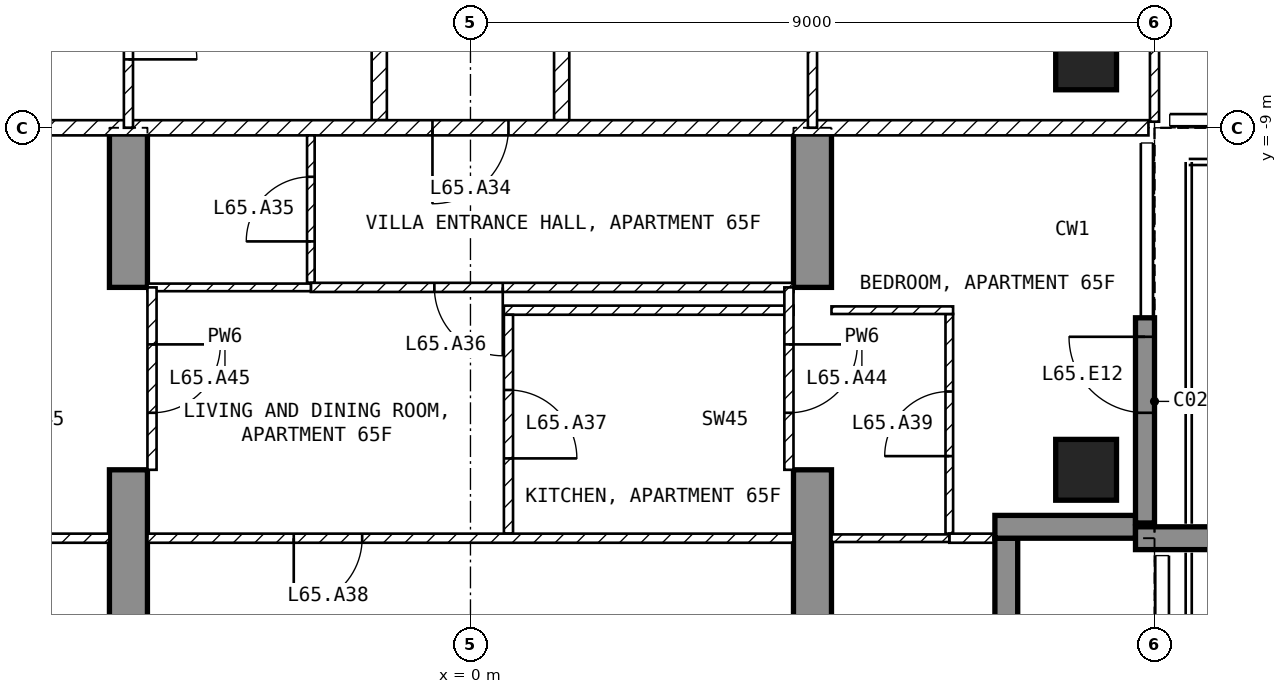
"""IFC4 building model, lengths in metres.
Left out: names, types, materials, properties, quantities, classifications, styles, units other than length and angle.
Written with IfcOpenShell. Run it as: python <this file> out.ifc"""

import sys

from ifc_helpers import new_model, si_unit, direction, frame, frame_2d, origin, origin_2d, place, context, subcontext, project, spatial, polyline, rectangle, outline, extrude, element, fill, save


model = new_model("IFC4")
c1 = context("Model", 3, precision=1e-05, world=origin(), true_north=direction((0.0, 1.0)))
c2 = subcontext(c1, "Body", "Model", "MODEL_VIEW")
j1 = project(units=[si_unit("LENGTHUNIT", "METRE"), si_unit("PLANEANGLEUNIT", "RADIAN")], contexts=[c1])
p1 = place(None, origin())
s1 = spatial("IfcSite", under=j1, at=p1, CompositionType="ELEMENT")
p2 = place(p1, origin())
s2 = spatial("IfcBuilding", under=s1, at=p2, CompositionType="ELEMENT")
p3 = place(p2, frame((0.0, 0.0, 257.0)))
s3 = spatial("IfcBuildingStorey", under=s2, at=p3, CompositionType="ELEMENT", Elevation=257.0)
for number, where, z_axis, x_axis in (
    (1, (8.1, -13.5, -0.25), (0.0, 0.0, 1.0), (1.0, 0.0, 0.0)),
    (2, (8.1, -8.1, -0.25), (0.0, 0.0, 1.0), (1.0, 0.0, 0.0)),
):
    element("IfcColumn", number, at=place(p3, frame(where, z_axis=z_axis, x_axis=x_axis)), inside=s3, PredefinedType="COLUMN", context=c2, shape_type="SweptSolid", body=[
        extrude(rectangle(XDim=0.8, YDim=0.8, at=origin_2d()), origin(), (0.0, 0.0, 1.0), 3.5),
    ])
for number, where, z_axis, x_axis in (
    (3, (-4.75, -16.7, -0.25), (1.0, 0.0, 0.0), (0.0, 1.0, 0.0)),
    (4, (4.25, -16.7, -0.25), (1.0, 0.0, 0.0), (0.0, 1.0, 0.0)),
):
    element("IfcWall", number, at=place(p3, frame(where, z_axis=z_axis, x_axis=x_axis)), inside=s3, PredefinedType="SHEAR", context=c2, shape_type="SweptSolid", body=[
        extrude(outline(polyline([(0.0, 0.0), (3.2, 0.0), (3.2, 2.65), (5.6, 2.65), (5.6, 0.0), (7.7, 0.0), (7.7, 3.5), (0.0, 3.5), (0.0, 0.0)])), origin(), (0.0, 0.0, 1.0), 0.5),
    ])
p4 = place(p3, frame((8.875, -14.2, 0.0), z_axis=(0.0, 0.0, 1.0), x_axis=(0.0, 1.0, 0.0)))
e5 = element("IfcWall", 5, at=p4, inside=s3, PredefinedType="SOLIDWALL", context=c2, shape_type="SweptSolid", body=[
    extrude(rectangle(XDim=2.7, YDim=0.25, at=frame_2d((1.35, 0.0))), origin(), (0.0, 0.0, 1.0), 3.25),
])
p5 = place(p4, frame((1.45, 0.0, 0.0)))
e6 = element("IfcOpeningElement", 6, at=p5, cuts=e5, PredefinedType="OPENING", context=c2, shape_type="SweptSolid", body=[
    extrude(rectangle(XDim=1.0, YDim=2.4, at=frame_2d((0.5, 1.2))), frame((0.0, 0.135, 0.0), z_axis=(0.0, -1.0, 0.0), x_axis=(1.0, 0.0, 0.0)), (0.0, 0.0, 1.0), 0.27),
])
p6 = place(p3, frame((7.05, -16.2, 0.0), z_axis=(0.0, 0.0, 1.0), x_axis=(0.0, 1.0, 0.0)))
e7 = element("IfcWall", 7, at=p6, inside=s3, PredefinedType="SOLIDWALL", context=c2, shape_type="SweptSolid", body=[
    extrude(rectangle(XDim=1.8, YDim=0.3, at=frame_2d((0.9, 0.0))), origin(), (0.0, 0.0, 1.0), 3.25),
])
p7 = place(p3, frame((6.9, -14.25, 0.0), z_axis=(0.0, 0.0, 1.0), x_axis=(1.0, 0.0, 0.0)))
e8 = element("IfcWall", 8, at=p7, inside=s3, PredefinedType="SOLIDWALL", context=c2, shape_type="SweptSolid", body=[
    extrude(rectangle(XDim=1.85, YDim=0.3, at=frame_2d((0.925, 0.0))), origin(), (0.0, 0.0, 1.0), 3.25),
])
p8 = place(p3, frame((8.75, -14.4, 0.0), z_axis=(0.0, 0.0, 1.0), x_axis=(1.0, 0.0, 0.0)))
e9 = element("IfcWall", 9, at=p8, inside=s3, PredefinedType="SOLIDWALL", context=c2, shape_type="SweptSolid", body=[
    extrude(rectangle(XDim=2.95, YDim=0.3, at=frame_2d((1.475, 0.0))), origin(), (0.0, 0.0, 1.0), 3.25),
])
for number, where, z_axis, x_axis in (
    (10, (1.2, -4.6, 0.0), (0.0, 0.0, 1.0), (0.0, -1.0, 0.0)),
    (11, (-1.2, -8.9, 0.0), (0.0, 0.0, 1.0), (0.0, 1.0, 0.0)),
):
    element("IfcWall", number, at=place(p3, frame(where, z_axis=z_axis, x_axis=x_axis)), inside=s3, PredefinedType="PARTITIONING", context=c2, shape_type="SweptSolid", body=[
        extrude(rectangle(XDim=4.3, YDim=0.2, at=frame_2d((2.15, 0.0))), origin(), (0.0, 0.0, 1.0), 3.25),
    ])
p9 = place(p3, frame((8.92, -9.0, 0.0), z_axis=(0.0, 0.0, 1.0), x_axis=(-1.0, 0.0, 0.0)))
e12 = element("IfcWall", 12, at=p9, inside=s3, PredefinedType="PARTITIONING", context=c2, shape_type="SweptSolid", body=[
    extrude(rectangle(XDim=17.84, YDim=0.2, at=frame_2d((8.92, 0.0))), origin(), (0.0, 0.0, 1.0), 3.25),
])
p10 = place(p9, frame((8.42, 0.0, 0.0)))
e13 = element("IfcOpeningElement", 13, at=p10, cuts=e12, PredefinedType="OPENING", context=c2, shape_type="SweptSolid", body=[
    extrude(rectangle(XDim=1.0, YDim=2.1, at=frame_2d((0.5, 1.05))), frame((0.0, 0.11, 0.0), z_axis=(0.0, -1.0, 0.0), x_axis=(1.0, 0.0, 0.0)), (0.0, 0.0, 1.0), 0.22),
])
p11 = place(p3, frame((9.0, -8.92, 0.0), z_axis=(0.0, 0.0, 1.0), x_axis=(0.0, 1.0, 0.0)))
e14 = element("IfcWall", 14, at=p11, inside=s3, PredefinedType="PARTITIONING", context=c2, shape_type="SweptSolid", body=[
    extrude(rectangle(XDim=5.32, YDim=0.12, at=frame_2d((2.66, 0.0))), origin(), (0.0, 0.0, 1.0), 3.25),
])
p12 = place(p11, frame((2.32, 0.0, 0.0)))
e15 = element("IfcOpeningElement", 15, at=p12, cuts=e14, PredefinedType="OPENING", context=c2, shape_type="SweptSolid", body=[
    extrude(rectangle(XDim=0.9, YDim=2.1, at=frame_2d((0.45, 1.05))), frame((0.0, 0.07, 0.0), z_axis=(0.0, -1.0, 0.0), x_axis=(1.0, 0.0, 0.0)), (0.0, 0.0, 1.0), 0.14),
])
p13 = place(p3, frame((4.5, -9.0, 0.0), z_axis=(0.0, 0.0, 1.0), x_axis=(0.0, 1.0, 0.0)))
e16 = element("IfcWall", 16, at=p13, inside=s3, PredefinedType="PARTITIONING", context=c2, shape_type="SweptSolid", body=[
    extrude(rectangle(XDim=4.5, YDim=0.12, at=frame_2d((2.25, 0.0))), origin(), (0.0, 0.0, 1.0), 3.25),
])
p14 = place(p13, frame((1.8, 0.0, 0.0)))
e17 = element("IfcOpeningElement", 17, at=p14, cuts=e16, PredefinedType="OPENING", context=c2, shape_type="SweptSolid", body=[
    extrude(rectangle(XDim=0.9, YDim=2.1, at=frame_2d((0.45, 1.05))), frame((0.0, 0.07, 0.0), z_axis=(0.0, -1.0, 0.0), x_axis=(1.0, 0.0, 0.0)), (0.0, 0.0, 1.0), 0.14),
])
p15 = place(p3, frame((-4.5, -6.3, 0.0), z_axis=(0.0, 0.0, 1.0), x_axis=(0.0, -1.0, 0.0)))
e18 = element("IfcWall", 18, at=p15, inside=s3, PredefinedType="PARTITIONING", context=c2, shape_type="SweptSolid", body=[
    extrude(rectangle(XDim=2.7, YDim=0.12, at=frame_2d((1.35, 0.0))), origin(), (0.0, 0.0, 1.0), 3.25),
])
p16 = place(p15, frame((0.9, 0.0, 0.0)))
e19 = element("IfcOpeningElement", 19, at=p16, cuts=e18, PredefinedType="OPENING", context=c2, shape_type="SweptSolid", body=[
    extrude(rectangle(XDim=0.9, YDim=2.1, at=frame_2d((0.45, 1.05))), frame((0.0, 0.07, 0.0), z_axis=(0.0, -1.0, 0.0), x_axis=(1.0, 0.0, 0.0)), (0.0, 0.0, 1.0), 0.14),
])
p17 = place(p3, frame((-2.1, -11.04, 0.0), z_axis=(0.0, 0.0, 1.0), x_axis=(0.0, 1.0, 0.0)))
e20 = element("IfcWall", 20, at=p17, inside=s3, PredefinedType="PARTITIONING", context=c2, shape_type="SweptSolid", body=[
    extrude(rectangle(XDim=1.94, YDim=0.1, at=frame_2d((0.97, 0.0))), origin(), (0.0, 0.0, 1.0), 3.25),
])
p18 = place(p17, frame((0.545, 0.0, 0.0)))
e21 = element("IfcOpeningElement", 21, at=p18, cuts=e20, PredefinedType="OPENING", context=c2, shape_type="SweptSolid", body=[
    extrude(rectangle(XDim=0.85, YDim=2.1, at=frame_2d((0.425, 1.05))), frame((0.0, 0.06, 0.0), z_axis=(0.0, -1.0, 0.0), x_axis=(1.0, 0.0, 0.0)), (0.0, 0.0, 1.0), 0.12),
])
p19 = place(p3, frame((4.25, -11.1, 0.0), z_axis=(0.0, 0.0, 1.0), x_axis=(-1.0, 0.0, 0.0)))
e22 = element("IfcWall", 22, at=p19, inside=s3, PredefinedType="PARTITIONING", context=c2, shape_type="SweptSolid", body=[
    extrude(rectangle(XDim=6.35, YDim=0.12, at=frame_2d((3.175, 0.0))), origin(), (0.0, 0.0, 1.0), 3.25),
])
p20 = place(p19, frame((3.825, 0.0, 0.0)))
e23 = element("IfcOpeningElement", 23, at=p20, cuts=e22, PredefinedType="OPENING", context=c2, shape_type="SweptSolid", body=[
    extrude(rectangle(XDim=0.9, YDim=2.1, at=frame_2d((0.45, 1.05))), frame((0.0, 0.07, 0.0), z_axis=(0.0, -1.0, 0.0), x_axis=(1.0, 0.0, 0.0)), (0.0, 0.0, 1.0), 0.14),
])
p21 = place(p3, frame((-2.1, -11.1, 0.0), z_axis=(0.0, 0.0, 1.0), x_axis=(-1.0, 0.0, 0.0)))
e24 = element("IfcWall", 24, at=p21, inside=s3, PredefinedType="PARTITIONING", context=c2, shape_type="SweptSolid", body=[
    extrude(rectangle(XDim=2.15, YDim=0.1, at=frame_2d((1.075, 0.0))), origin(), (0.0, 0.0, 1.0), 3.25),
])
p22 = place(p3, frame((4.25, -11.4, 0.0), z_axis=(0.0, 0.0, 1.0), x_axis=(-1.0, 0.0, 0.0)))
e25 = element("IfcWall", 25, at=p22, inside=s3, PredefinedType="PARTITIONING", context=c2, shape_type="SweptSolid", body=[
    extrude(rectangle(XDim=3.81, YDim=0.12, at=frame_2d((1.905, 0.0))), origin(), (0.0, 0.0, 1.0), 3.25),
])
p23 = place(p3, frame((0.5, -11.46, 0.0), z_axis=(0.0, 0.0, 1.0), x_axis=(0.0, -1.0, 0.0)))
e26 = element("IfcWall", 26, at=p23, inside=s3, PredefinedType="PARTITIONING", context=c2, shape_type="SweptSolid", body=[
    extrude(rectangle(XDim=2.88, YDim=0.12, at=frame_2d((1.44, 0.0))), origin(), (0.0, 0.0, 1.0), 3.25),
])
p24 = place(p23, frame((0.99, 0.0, 0.0)))
e27 = element("IfcOpeningElement", 27, at=p24, cuts=e26, PredefinedType="OPENING", context=c2, shape_type="SweptSolid", body=[
    extrude(rectangle(XDim=0.9, YDim=2.1, at=frame_2d((0.45, 1.05))), frame((0.0, 0.07, 0.0), z_axis=(0.0, -1.0, 0.0), x_axis=(1.0, 0.0, 0.0)), (0.0, 0.0, 1.0), 0.14),
])
p25 = place(p3, frame((4.25, -14.4, 0.0), z_axis=(0.0, 0.0, 1.0), x_axis=(-1.0, 0.0, 0.0)))
e28 = element("IfcWall", 28, at=p25, inside=s3, PredefinedType="PARTITIONING", context=c2, shape_type="SweptSolid", body=[
    extrude(rectangle(XDim=8.5, YDim=0.12, at=frame_2d((4.25, 0.0))), origin(), (0.0, 0.0, 1.0), 3.25),
])
p26 = place(p25, frame((5.675, 0.0, 0.0)))
e29 = element("IfcOpeningElement", 29, at=p26, cuts=e28, PredefinedType="OPENING", context=c2, shape_type="SweptSolid", body=[
    extrude(rectangle(XDim=0.9, YDim=2.1, at=frame_2d((0.45, 1.05))), frame((0.0, 0.07, 0.0), z_axis=(0.0, -1.0, 0.0), x_axis=(1.0, 0.0, 0.0)), (0.0, 0.0, 1.0), 0.14),
])
p27 = place(p3, frame((6.3, -14.34, 0.0), z_axis=(0.0, 0.0, 1.0), x_axis=(0.0, 1.0, 0.0)))
e30 = element("IfcWall", 30, at=p27, inside=s3, PredefinedType="PARTITIONING", context=c2, shape_type="SweptSolid", body=[
    extrude(rectangle(XDim=2.89, YDim=0.1, at=frame_2d((1.445, 0.0))), origin(), (0.0, 0.0, 1.0), 3.25),
])
p28 = place(p27, frame((1.02, 0.0, 0.0)))
e31 = element("IfcOpeningElement", 31, at=p28, cuts=e30, PredefinedType="OPENING", context=c2, shape_type="SweptSolid", body=[
    extrude(rectangle(XDim=0.85, YDim=2.1, at=frame_2d((0.425, 1.05))), frame((0.0, 0.06, 0.0), z_axis=(0.0, -1.0, 0.0), x_axis=(1.0, 0.0, 0.0)), (0.0, 0.0, 1.0), 0.12),
])
p29 = place(p3, frame((6.35, -11.4, 0.0), z_axis=(0.0, 0.0, 1.0), x_axis=(-1.0, 0.0, 0.0)))
e32 = element("IfcWall", 32, at=p29, inside=s3, PredefinedType="PARTITIONING", context=c2, shape_type="SweptSolid", body=[
    extrude(rectangle(XDim=1.6, YDim=0.1, at=frame_2d((0.8, 0.0))), origin(), (0.0, 0.0, 1.0), 3.25),
])
p30 = place(p3, frame((7.12, -14.4, 0.0), z_axis=(0.0, 0.0, 1.0), x_axis=(-1.0, 0.0, 0.0)))
e33 = element("IfcWall", 33, at=p30, inside=s3, PredefinedType="PARTITIONING", context=c2, shape_type="SweptSolid", body=[
    extrude(rectangle(XDim=0.82, YDim=0.12, at=frame_2d((0.41, 0.0))), origin(), (0.0, 0.0, 1.0), 3.25),
])
p31 = place(p3, frame((6.3, -14.4, 0.0), z_axis=(0.0, 0.0, 1.0), x_axis=(-1.0, 0.0, 0.0)))
e34 = element("IfcWall", 34, at=p31, inside=s3, PredefinedType="PARTITIONING", context=c2, shape_type="SweptSolid", body=[
    extrude(rectangle(XDim=1.55, YDim=0.1, at=frame_2d((0.775, 0.0))), origin(), (0.0, 0.0, 1.0), 3.25),
])
p32 = place(p3, frame((-4.75, -14.4, 0.0), z_axis=(0.0, 0.0, 1.0), x_axis=(-1.0, 0.0, 0.0)))
e35 = element("IfcWall", 35, at=p32, inside=s3, PredefinedType="PARTITIONING", context=c2, shape_type="SweptSolid", body=[
    extrude(rectangle(XDim=2.37, YDim=0.12, at=frame_2d((1.185, 0.0))), origin(), (0.0, 0.0, 1.0), 3.25),
])
p33 = place(p3, frame((4.19, -11.1, 0.0), z_axis=(0.0, 0.0, 1.0), x_axis=(0.0, -1.0, 0.0)))
e36 = element("IfcWall", 36, at=p33, inside=s3, PredefinedType="PARTITIONING", context=c2, shape_type="SweptSolid", body=[
    extrude(rectangle(XDim=2.4, YDim=0.12, at=frame_2d((1.2, 0.0))), origin(), (0.0, 0.0, 1.0), 2.4),
])
p34 = place(p33, frame((0.75, 0.0, 0.0)))
e37 = element("IfcOpeningElement", 37, at=p34, cuts=e36, PredefinedType="OPENING", context=c2, shape_type="SweptSolid", body=[
    extrude(rectangle(XDim=0.9, YDim=2.1, at=frame_2d((0.45, 1.05))), frame((0.0, 0.07, 0.0), z_axis=(0.0, -1.0, 0.0), x_axis=(1.0, 0.0, 0.0)), (0.0, 0.0, 1.0), 0.14),
])
p35 = place(p3, frame((-4.19, -11.1, 0.0), z_axis=(0.0, 0.0, 1.0), x_axis=(0.0, -1.0, 0.0)))
e38 = element("IfcWall", 38, at=p35, inside=s3, PredefinedType="PARTITIONING", context=c2, shape_type="SweptSolid", body=[
    extrude(rectangle(XDim=2.4, YDim=0.12, at=frame_2d((1.2, 0.0))), origin(), (0.0, 0.0, 1.0), 2.4),
])
p36 = place(p35, frame((0.75, 0.0, 0.0)))
e39 = element("IfcOpeningElement", 39, at=p36, cuts=e38, PredefinedType="OPENING", context=c2, shape_type="SweptSolid", body=[
    extrude(rectangle(XDim=0.9, YDim=2.1, at=frame_2d((0.45, 1.05))), frame((0.0, 0.07, 0.0), z_axis=(0.0, -1.0, 0.0), x_axis=(1.0, 0.0, 0.0)), (0.0, 0.0, 1.0), 0.14),
])
p37 = place(p5, origin())
e40 = element("IfcDoor", 40, at=p37, inside=s3, OperationType="SINGLE_SWING_RIGHT", PredefinedType="DOOR", context=c2, shape_type="SweptSolid", body=[
    extrude(rectangle(XDim=1.0, YDim=2.4, at=frame_2d((0.5, 1.2))), frame((0.0, 0.025, 0.0), z_axis=(0.0, -1.0, 0.0), x_axis=(1.0, 0.0, 0.0)), (0.0, 0.0, 1.0), 0.05),
])
fill(e6, e40)
p38 = place(p16, origin())
e41 = element("IfcDoor", 41, at=p38, inside=s3, OperationType="SINGLE_SWING_RIGHT", PredefinedType="DOOR", context=c2, shape_type="SweptSolid", body=[
    extrude(rectangle(XDim=0.9, YDim=2.1, at=frame_2d((0.45, 1.05))), frame((0.0, 0.025, 0.0), z_axis=(0.0, -1.0, 0.0), x_axis=(1.0, 0.0, 0.0)), (0.0, 0.0, 1.0), 0.05),
])
fill(e19, e41)
p39 = place(p10, origin())
e42 = element("IfcDoor", 42, at=p39, inside=s3, OperationType="SINGLE_SWING_RIGHT", PredefinedType="DOOR", context=c2, shape_type="SweptSolid", body=[
    extrude(rectangle(XDim=1.0, YDim=2.1, at=frame_2d((0.5, 1.05))), frame((0.0, 0.025, 0.0), z_axis=(0.0, -1.0, 0.0), x_axis=(1.0, 0.0, 0.0)), (0.0, 0.0, 1.0), 0.05),
])
fill(e13, e42)
p40 = place(p18, origin())
e43 = element("IfcDoor", 43, at=p40, inside=s3, OperationType="SINGLE_SWING_LEFT", PredefinedType="DOOR", context=c2, shape_type="SweptSolid", body=[
    extrude(rectangle(XDim=0.85, YDim=2.1, at=frame_2d((0.425, 1.05))), frame((0.0, 0.025, 0.0), z_axis=(0.0, -1.0, 0.0), x_axis=(1.0, 0.0, 0.0)), (0.0, 0.0, 1.0), 0.05),
])
fill(e21, e43)
p41 = place(p20, origin())
e44 = element("IfcDoor", 44, at=p41, inside=s3, OperationType="SINGLE_SWING_LEFT", PredefinedType="DOOR", context=c2, shape_type="SweptSolid", body=[
    extrude(rectangle(XDim=0.9, YDim=2.1, at=frame_2d((0.45, 1.05))), frame((0.0, 0.025, 0.0), z_axis=(0.0, -1.0, 0.0), x_axis=(1.0, 0.0, 0.0)), (0.0, 0.0, 1.0), 0.05),
])
fill(e23, e44)
p42 = place(p24, origin())
e45 = element("IfcDoor", 45, at=p42, inside=s3, OperationType="SINGLE_SWING_RIGHT", PredefinedType="DOOR", context=c2, shape_type="SweptSolid", body=[
    extrude(rectangle(XDim=0.9, YDim=2.1, at=frame_2d((0.45, 1.05))), frame((0.0, 0.025, 0.0), z_axis=(0.0, -1.0, 0.0), x_axis=(1.0, 0.0, 0.0)), (0.0, 0.0, 1.0), 0.05),
])
fill(e27, e45)
p43 = place(p26, origin())
e46 = element("IfcDoor", 46, at=p43, inside=s3, OperationType="SINGLE_SWING_RIGHT", PredefinedType="DOOR", context=c2, shape_type="SweptSolid", body=[
    extrude(rectangle(XDim=0.9, YDim=2.1, at=frame_2d((0.45, 1.05))), frame((0.0, 0.025, 0.0), z_axis=(0.0, -1.0, 0.0), x_axis=(1.0, 0.0, 0.0)), (0.0, 0.0, 1.0), 0.05),
])
fill(e29, e46)
p44 = place(p28, origin())
e47 = element("IfcDoor", 47, at=p44, inside=s3, OperationType="SINGLE_SWING_LEFT", PredefinedType="DOOR", context=c2, shape_type="SweptSolid", body=[
    extrude(rectangle(XDim=0.85, YDim=2.1, at=frame_2d((0.425, 1.05))), frame((0.0, 0.025, 0.0), z_axis=(0.0, -1.0, 0.0), x_axis=(1.0, 0.0, 0.0)), (0.0, 0.0, 1.0), 0.05),
])
fill(e31, e47)
p45 = place(p34, origin())
e48 = element("IfcDoor", 48, at=p45, inside=s3, OperationType="SINGLE_SWING_LEFT", PredefinedType="DOOR", context=c2, shape_type="SweptSolid", body=[
    extrude(rectangle(XDim=0.9, YDim=2.1, at=frame_2d((0.45, 1.05))), frame((0.0, 0.025, 0.0), z_axis=(0.0, -1.0, 0.0), x_axis=(1.0, 0.0, 0.0)), (0.0, 0.0, 1.0), 0.05),
])
fill(e37, e48)
p46 = place(p36, origin())
e49 = element("IfcDoor", 49, at=p46, inside=s3, OperationType="SINGLE_SWING_LEFT", PredefinedType="DOOR", context=c2, shape_type="SweptSolid", body=[
    extrude(rectangle(XDim=0.9, YDim=2.1, at=frame_2d((0.45, 1.05))), frame((0.0, 0.025, 0.0), z_axis=(0.0, -1.0, 0.0), x_axis=(1.0, 0.0, 0.0)), (0.0, 0.0, 1.0), 0.05),
])
fill(e39, e49)
save(model, sys.argv[1])
